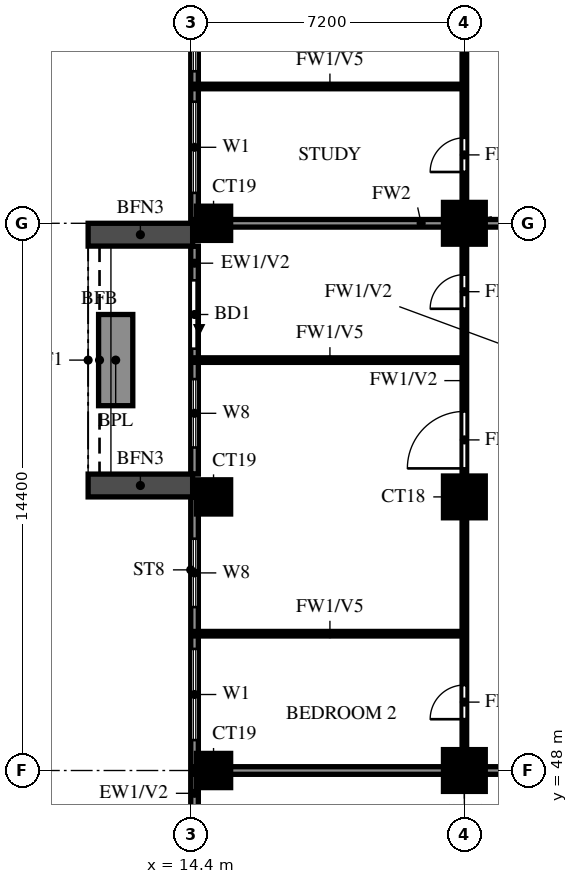
"""IFC4 building model, lengths in metres.
Left out: names, types, materials, properties, quantities, classifications, styles, units other than length and angle.
Written with IfcOpenShell. Run it as: python <this file> out.ifc"""

import sys

from ifc_helpers import new_model, si_unit, direction, frame, frame_2d, origin, origin_2d, place, context, subcontext, project, spatial, rectangle, extrude, source, transform, mapped, element, fill, save


model = new_model("IFC4")
c1 = context("Model", 3, precision=1e-05, world=origin(), true_north=direction((0.0, 1.0)))
c2 = subcontext(c1, "Body", "Model", "MODEL_VIEW")
j1 = project(units=[si_unit("LENGTHUNIT", "METRE"), si_unit("PLANEANGLEUNIT", "RADIAN")], contexts=[c1])
p1 = place(None, origin())
s1 = spatial("IfcSite", under=j1, at=p1, CompositionType="ELEMENT")
p2 = place(p1, origin())
s2 = spatial("IfcBuilding", under=s1, at=p2, CompositionType="ELEMENT")
p3 = place(p2, frame((0.0, 0.0, 120.0)))
s3 = spatial("IfcBuildingStorey", under=s2, at=p3, CompositionType="ELEMENT", Elevation=120.0)
m1 = source(origin(), c2, "Body", "SweptSolid", [
    extrude(rectangle(XDim=0.9, YDim=0.9, at=origin_2d()), origin(), (0.0, 0.0, 1.0), 3.2),
])
p4 = place(p3, frame((15.0, 48.0, 0.0), z_axis=(0.0, 0.0, 1.0), x_axis=(1.0, 0.0, 0.0)))
e1 = element("IfcColumn", 1, at=p4, inside=s3, PredefinedType="COLUMN", context=c2, shape_type="MappedRepresentation", body=[
    mapped(m1, transform((0.0, 0.0, 0.0))),
])
m2 = source(origin(), c2, "Body", "SweptSolid", [
    extrude(rectangle(XDim=1.1, YDim=1.1, at=origin_2d()), origin(), (0.0, 0.0, 1.0), 3.2),
])
p5 = place(p3, frame((21.6, 48.0, 0.0), z_axis=(0.0, 0.0, 1.0), x_axis=(1.0, 0.0, 0.0)))
e2 = element("IfcColumn", 2, at=p5, inside=s3, PredefinedType="COLUMN", context=c2, shape_type="MappedRepresentation", body=[
    mapped(m2, transform((0.0, 0.0, 0.0))),
])
p6 = place(p3, frame((15.0, 55.2, 0.0), z_axis=(0.0, 0.0, 1.0), x_axis=(1.0, 0.0, 0.0)))
e3 = element("IfcColumn", 3, at=p6, inside=s3, PredefinedType="COLUMN", context=c2, shape_type="MappedRepresentation", body=[
    mapped(m1, transform((0.0, 0.0, 0.0))),
])
p7 = place(p3, frame((21.6, 55.2, 0.0), z_axis=(0.0, 0.0, 1.0), x_axis=(1.0, 0.0, 0.0)))
e4 = element("IfcColumn", 4, at=p7, inside=s3, PredefinedType="COLUMN", context=c2, shape_type="MappedRepresentation", body=[
    mapped(m2, transform((0.0, 0.0, 0.0))),
])
p8 = place(p3, frame((15.0, 62.4, 0.0), z_axis=(0.0, 0.0, 1.0), x_axis=(1.0, 0.0, 0.0)))
e5 = element("IfcColumn", 5, at=p8, inside=s3, PredefinedType="COLUMN", context=c2, shape_type="MappedRepresentation", body=[
    mapped(m1, transform((0.0, 0.0, 0.0))),
])
p9 = place(p3, frame((21.6, 62.4, 0.0), z_axis=(0.0, 0.0, 1.0), x_axis=(1.0, 0.0, 0.0)))
e6 = element("IfcColumn", 6, at=p9, inside=s3, PredefinedType="COLUMN", context=c2, shape_type="MappedRepresentation", body=[
    mapped(m2, transform((0.0, 0.0, 0.0))),
])
p10 = place(p3, frame((14.5, 76.6, 0.0), z_axis=(0.0, 0.0, 1.0), x_axis=(0.0, -1.0, 0.0)))
e7 = element("IfcWall", 7, at=p10, inside=s3, PredefinedType="SOLIDWALL", context=c2, shape_type="SweptSolid", body=[
    extrude(rectangle(XDim=14.2, YDim=0.2, at=frame_2d((7.1, 0.0))), origin(), (0.0, 0.0, 1.0), 3.2),
])
p11 = place(p10, frame((11.0, 0.0, 0.6)))
e8 = element("IfcOpeningElement", 8, at=p11, cuts=e7, PredefinedType="OPENING", context=c2, shape_type="SweptSolid", body=[
    extrude(rectangle(XDim=2.4, YDim=2.4, at=frame_2d((1.2, 1.2))), frame((0.0, 0.11, 0.0), z_axis=(0.0, -1.0, 0.0), x_axis=(1.0, 0.0, 0.0)), (0.0, 0.0, 1.0), 0.22),
])
p12 = place(p10, frame((7.8, 0.0, 0.6)))
e9 = element("IfcOpeningElement", 9, at=p12, cuts=e7, PredefinedType="OPENING", context=c2, shape_type="SweptSolid", body=[
    extrude(rectangle(XDim=2.4, YDim=2.4, at=frame_2d((1.2, 1.2))), frame((0.0, 0.11, 0.0), z_axis=(0.0, -1.0, 0.0), x_axis=(1.0, 0.0, 0.0)), (0.0, 0.0, 1.0), 0.22),
])
p13 = place(p10, frame((4.55, 0.0, 1.5)))
e10 = element("IfcOpeningElement", 10, at=p13, cuts=e7, PredefinedType="OPENING", context=c2, shape_type="SweptSolid", body=[
    extrude(rectangle(XDim=0.9, YDim=0.9, at=frame_2d((0.45, 0.45))), frame((0.0, 0.11, 0.0), z_axis=(0.0, -1.0, 0.0), x_axis=(1.0, 0.0, 0.0)), (0.0, 0.0, 1.0), 0.22),
])
p14 = place(p10, frame((0.6, 0.0, 0.6)))
e11 = element("IfcOpeningElement", 11, at=p14, cuts=e7, PredefinedType="OPENING", context=c2, shape_type="SweptSolid", body=[
    extrude(rectangle(XDim=2.4, YDim=2.4, at=frame_2d((1.2, 1.2))), frame((0.0, 0.11, 0.0), z_axis=(0.0, -1.0, 0.0), x_axis=(1.0, 0.0, 0.0)), (0.0, 0.0, 1.0), 0.22),
])
p15 = place(p3, frame((14.5, 61.8, 0.0), z_axis=(0.0, 0.0, 1.0), x_axis=(0.0, -1.0, 0.0)))
e12 = element("IfcWall", 12, at=p15, inside=s3, PredefinedType="SOLIDWALL", context=c2, shape_type="SweptSolid", body=[
    extrude(rectangle(XDim=6.0, YDim=0.2, at=frame_2d((3.0, 0.0))), origin(), (0.0, 0.0, 1.0), 3.2),
])
p16 = place(p15, frame((0.9, 0.0, 0.0)))
e13 = element("IfcOpeningElement", 13, at=p16, cuts=e12, PredefinedType="OPENING", context=c2, shape_type="SweptSolid", body=[
    extrude(rectangle(XDim=1.8, YDim=2.4, at=frame_2d((0.9, 1.2))), frame((0.0, 0.11, 0.0), z_axis=(0.0, -1.0, 0.0), x_axis=(1.0, 0.0, 0.0)), (0.0, 0.0, 1.0), 0.22),
])
p17 = place(p15, frame((3.5, 0.0, 0.6)))
e14 = element("IfcOpeningElement", 14, at=p17, cuts=e12, PredefinedType="OPENING", context=c2, shape_type="SweptSolid", body=[
    extrude(rectangle(XDim=1.8, YDim=2.4, at=frame_2d((0.9, 1.2))), frame((0.0, 0.11, 0.0), z_axis=(0.0, -1.0, 0.0), x_axis=(1.0, 0.0, 0.0)), (0.0, 0.0, 1.0), 0.22),
])
p18 = place(p3, frame((14.5, 55.2, 0.0), z_axis=(0.0, 0.0, 1.0), x_axis=(0.0, -1.0, 0.0)))
e15 = element("IfcWall", 15, at=p18, inside=s3, PredefinedType="SOLIDWALL", context=c2, shape_type="SweptSolid", body=[
    extrude(rectangle(XDim=12.0, YDim=0.2, at=frame_2d((6.0, 0.0))), origin(), (0.0, 0.0, 1.0), 3.2),
])
p19 = place(p18, frame((8.5, 0.0, 0.6)))
e16 = element("IfcOpeningElement", 16, at=p19, cuts=e15, PredefinedType="OPENING", context=c2, shape_type="SweptSolid", body=[
    extrude(rectangle(XDim=2.4, YDim=2.4, at=frame_2d((1.2, 1.2))), frame((0.0, 0.11, 0.0), z_axis=(0.0, -1.0, 0.0), x_axis=(1.0, 0.0, 0.0)), (0.0, 0.0, 1.0), 0.22),
])
p20 = place(p18, frame((4.0, 0.0, 0.6)))
e17 = element("IfcOpeningElement", 17, at=p20, cuts=e15, PredefinedType="OPENING", context=c2, shape_type="SweptSolid", body=[
    extrude(rectangle(XDim=2.4, YDim=2.4, at=frame_2d((1.2, 1.2))), frame((0.0, 0.11, 0.0), z_axis=(0.0, -1.0, 0.0), x_axis=(1.0, 0.0, 0.0)), (0.0, 0.0, 1.0), 0.22),
])
p21 = place(p18, frame((1.1, 0.0, 0.6)))
e18 = element("IfcOpeningElement", 18, at=p21, cuts=e15, PredefinedType="OPENING", context=c2, shape_type="SweptSolid", body=[
    extrude(rectangle(XDim=1.8, YDim=2.4, at=frame_2d((0.9, 1.2))), frame((0.0, 0.11, 0.0), z_axis=(0.0, -1.0, 0.0), x_axis=(1.0, 0.0, 0.0)), (0.0, 0.0, 1.0), 0.22),
])
for number, where, z_axis, x_axis in (
    (19, (14.45, 62.1, 0.0), (0.0, 0.0, 1.0), (-1.0, 0.0, 0.0)),
    (20, (14.45, 55.5, 0.0), (0.0, 0.0, 1.0), (-1.0, 0.0, 0.0)),
):
    element("IfcWall", number, at=place(p3, frame(where, z_axis=z_axis, x_axis=x_axis)), inside=s3, PredefinedType="SOLIDWALL", context=c2, shape_type="SweptSolid", body=[
        extrude(rectangle(XDim=2.75, YDim=0.6, at=frame_2d((1.375, 0.0))), origin(), (0.0, 0.0, 1.0), 2.85),
    ])
p22 = place(p3, frame((12.425, 60.0, 0.0), z_axis=(0.0, 0.0, 1.0), x_axis=(0.0, -1.0, 0.0)))
e21 = element("IfcWall", 21, at=p22, inside=s3, PredefinedType="SOLIDWALL", context=c2, shape_type="SweptSolid", body=[
    extrude(rectangle(XDim=2.4, YDim=0.9, at=frame_2d((1.2, 0.0))), origin(), (0.0, 0.0, 1.0), 0.9),
])
p23 = place(p3, frame((14.525, 48.0, 0.0), z_axis=(0.0, 0.0, 1.0), x_axis=(1.0, 0.0, 0.0)))
e22 = element("IfcWall", 22, at=p23, inside=s3, PredefinedType="SOLIDWALL", context=c2, shape_type="SweptSolid", body=[
    extrude(rectangle(XDim=19.075, YDim=0.2, at=frame_2d((9.538, 0.0))), origin(), (0.0, 0.0, 1.0), 3.2),
])
p24 = place(p3, frame((14.525, 62.4, 0.0), z_axis=(0.0, 0.0, 1.0), x_axis=(1.0, 0.0, 0.0)))
e23 = element("IfcWall", 23, at=p24, inside=s3, PredefinedType="SOLIDWALL", context=c2, shape_type="SweptSolid", body=[
    extrude(rectangle(XDim=11.875, YDim=0.2, at=frame_2d((5.938, 0.0))), origin(), (0.0, 0.0, 1.0), 3.2),
])
for number, where, z_axis, x_axis in (
    (24, (14.525, 51.6, 0.0), (0.0, 0.0, 1.0), (1.0, 0.0, 0.0)),
    (25, (14.525, 58.8, 0.0), (0.0, 0.0, 1.0), (1.0, 0.0, 0.0)),
    (26, (14.525, 66.0, 0.0), (0.0, 0.0, 1.0), (1.0, 0.0, 0.0)),
):
    element("IfcWall", number, at=place(p3, frame(where, z_axis=z_axis, x_axis=x_axis)), inside=s3, PredefinedType="PARTITIONING", context=c2, shape_type="SweptSolid", body=[
        extrude(rectangle(XDim=7.075, YDim=0.12, at=frame_2d((3.538, 0.0))), origin(), (0.0, 0.0, 1.0), 2.3),
    ])
p25 = place(p3, frame((21.6, 48.0, 0.0), z_axis=(0.0, 0.0, 1.0), x_axis=(0.0, 1.0, 0.0)))
e27 = element("IfcWall", 27, at=p25, inside=s3, PredefinedType="PARTITIONING", context=c2, shape_type="SweptSolid", body=[
    extrude(rectangle(XDim=21.6, YDim=0.12, at=frame_2d((10.8, 0.0))), origin(), (0.0, 0.0, 1.0), 3.2),
])
p26 = place(p25, frame((1.35, 0.0, 0.0)))
e28 = element("IfcOpeningElement", 28, at=p26, cuts=e27, PredefinedType="OPENING", context=c2, shape_type="SweptSolid", body=[
    extrude(rectangle(XDim=0.9, YDim=2.1, at=frame_2d((0.45, 1.05))), frame((0.0, 0.07, 0.0), z_axis=(0.0, -1.0, 0.0), x_axis=(1.0, 0.0, 0.0)), (0.0, 0.0, 1.0), 0.14),
])
p27 = place(p25, frame((7.95, 0.0, 0.0)))
e29 = element("IfcOpeningElement", 29, at=p27, cuts=e27, PredefinedType="OPENING", context=c2, shape_type="SweptSolid", body=[
    extrude(rectangle(XDim=1.5, YDim=2.1, at=frame_2d((0.75, 1.05))), frame((0.0, 0.07, 0.0), z_axis=(0.0, -1.0, 0.0), x_axis=(1.0, 0.0, 0.0)), (0.0, 0.0, 1.0), 0.14),
])
p28 = place(p25, frame((12.15, 0.0, 0.0)))
e30 = element("IfcOpeningElement", 30, at=p28, cuts=e27, PredefinedType="OPENING", context=c2, shape_type="SweptSolid", body=[
    extrude(rectangle(XDim=0.9, YDim=2.1, at=frame_2d((0.45, 1.05))), frame((0.0, 0.07, 0.0), z_axis=(0.0, -1.0, 0.0), x_axis=(1.0, 0.0, 0.0)), (0.0, 0.0, 1.0), 0.14),
])
p29 = place(p25, frame((15.75, 0.0, 0.0)))
e31 = element("IfcOpeningElement", 31, at=p29, cuts=e27, PredefinedType="OPENING", context=c2, shape_type="SweptSolid", body=[
    extrude(rectangle(XDim=0.9, YDim=2.1, at=frame_2d((0.45, 1.05))), frame((0.0, 0.07, 0.0), z_axis=(0.0, -1.0, 0.0), x_axis=(1.0, 0.0, 0.0)), (0.0, 0.0, 1.0), 0.14),
])
p30 = place(p25, frame((19.35, 0.0, 0.0)))
e32 = element("IfcOpeningElement", 32, at=p30, cuts=e27, PredefinedType="OPENING", context=c2, shape_type="SweptSolid", body=[
    extrude(rectangle(XDim=0.9, YDim=2.1, at=frame_2d((0.45, 1.05))), frame((0.0, 0.07, 0.0), z_axis=(0.0, -1.0, 0.0), x_axis=(1.0, 0.0, 0.0)), (0.0, 0.0, 1.0), 0.14),
])
p31 = place(p11, origin())
e33 = element("IfcWindow", 33, at=p31, inside=s3, PartitioningType="DOUBLE_PANEL_VERTICAL", PredefinedType="WINDOW", context=c2, shape_type="SweptSolid", body=[
    extrude(rectangle(XDim=2.4, YDim=2.4, at=frame_2d((1.2, 1.2))), frame((0.0, 0.03, 0.0), z_axis=(0.0, -1.0, 0.0), x_axis=(1.0, 0.0, 0.0)), (0.0, 0.0, 1.0), 0.06),
])
fill(e8, e33)
p32 = place(p12, origin())
e34 = element("IfcWindow", 34, at=p32, inside=s3, PartitioningType="DOUBLE_PANEL_VERTICAL", PredefinedType="WINDOW", context=c2, shape_type="SweptSolid", body=[
    extrude(rectangle(XDim=2.4, YDim=2.4, at=frame_2d((1.2, 1.2))), frame((0.0, 0.03, 0.0), z_axis=(0.0, -1.0, 0.0), x_axis=(1.0, 0.0, 0.0)), (0.0, 0.0, 1.0), 0.06),
])
fill(e9, e34)
p33 = place(p16, origin())
e35 = element("IfcDoor", 35, at=p33, inside=s3, OperationType="DOUBLE_DOOR_SLIDING", PredefinedType="DOOR", context=c2, shape_type="SweptSolid", body=[
    extrude(rectangle(XDim=1.8, YDim=2.4, at=frame_2d((0.9, 1.2))), frame((0.0, 0.025, 0.0), z_axis=(0.0, -1.0, 0.0), x_axis=(1.0, 0.0, 0.0)), (0.0, 0.0, 1.0), 0.05),
])
fill(e13, e35)
p34 = place(p17, origin())
e36 = element("IfcWindow", 36, at=p34, inside=s3, PartitioningType="DOUBLE_PANEL_VERTICAL", PredefinedType="WINDOW", context=c2, shape_type="SweptSolid", body=[
    extrude(rectangle(XDim=1.8, YDim=2.4, at=frame_2d((0.9, 1.2))), frame((0.0, 0.03, 0.0), z_axis=(0.0, -1.0, 0.0), x_axis=(1.0, 0.0, 0.0)), (0.0, 0.0, 1.0), 0.06),
])
fill(e14, e36)
p35 = place(p20, origin())
e37 = element("IfcWindow", 37, at=p35, inside=s3, PartitioningType="DOUBLE_PANEL_VERTICAL", PredefinedType="WINDOW", context=c2, shape_type="SweptSolid", body=[
    extrude(rectangle(XDim=2.4, YDim=2.4, at=frame_2d((1.2, 1.2))), frame((0.0, 0.03, 0.0), z_axis=(0.0, -1.0, 0.0), x_axis=(1.0, 0.0, 0.0)), (0.0, 0.0, 1.0), 0.06),
])
fill(e17, e37)
p36 = place(p21, origin())
e38 = element("IfcWindow", 38, at=p36, inside=s3, PartitioningType="DOUBLE_PANEL_VERTICAL", PredefinedType="WINDOW", context=c2, shape_type="SweptSolid", body=[
    extrude(rectangle(XDim=1.8, YDim=2.4, at=frame_2d((0.9, 1.2))), frame((0.0, 0.03, 0.0), z_axis=(0.0, -1.0, 0.0), x_axis=(1.0, 0.0, 0.0)), (0.0, 0.0, 1.0), 0.06),
])
fill(e18, e38)
p37 = place(p26, origin())
e39 = element("IfcDoor", 39, at=p37, inside=s3, OperationType="SINGLE_SWING_RIGHT", PredefinedType="DOOR", context=c2, shape_type="SweptSolid", body=[
    extrude(rectangle(XDim=0.9, YDim=2.1, at=frame_2d((0.45, 1.05))), frame((0.0, 0.025, 0.0), z_axis=(0.0, -1.0, 0.0), x_axis=(1.0, 0.0, 0.0)), (0.0, 0.0, 1.0), 0.05),
])
fill(e28, e39)
p38 = place(p27, origin())
e40 = element("IfcDoor", 40, at=p38, inside=s3, OperationType="SINGLE_SWING_RIGHT", PredefinedType="DOOR", context=c2, shape_type="SweptSolid", body=[
    extrude(rectangle(XDim=1.5, YDim=2.1, at=frame_2d((0.75, 1.05))), frame((0.0, 0.025, 0.0), z_axis=(0.0, -1.0, 0.0), x_axis=(1.0, 0.0, 0.0)), (0.0, 0.0, 1.0), 0.05),
])
fill(e29, e40)
p39 = place(p28, origin())
e41 = element("IfcDoor", 41, at=p39, inside=s3, OperationType="SINGLE_SWING_LEFT", PredefinedType="DOOR", context=c2, shape_type="SweptSolid", body=[
    extrude(rectangle(XDim=0.9, YDim=2.1, at=frame_2d((0.45, 1.05))), frame((0.0, 0.025, 0.0), z_axis=(0.0, -1.0, 0.0), x_axis=(1.0, 0.0, 0.0)), (0.0, 0.0, 1.0), 0.05),
])
fill(e30, e41)
p40 = place(p29, origin())
e42 = element("IfcDoor", 42, at=p40, inside=s3, OperationType="SINGLE_SWING_LEFT", PredefinedType="DOOR", context=c2, shape_type="SweptSolid", body=[
    extrude(rectangle(XDim=0.9, YDim=2.1, at=frame_2d((0.45, 1.05))), frame((0.0, 0.025, 0.0), z_axis=(0.0, -1.0, 0.0), x_axis=(1.0, 0.0, 0.0)), (0.0, 0.0, 1.0), 0.05),
])
fill(e31, e42)
save(model, sys.argv[1])
